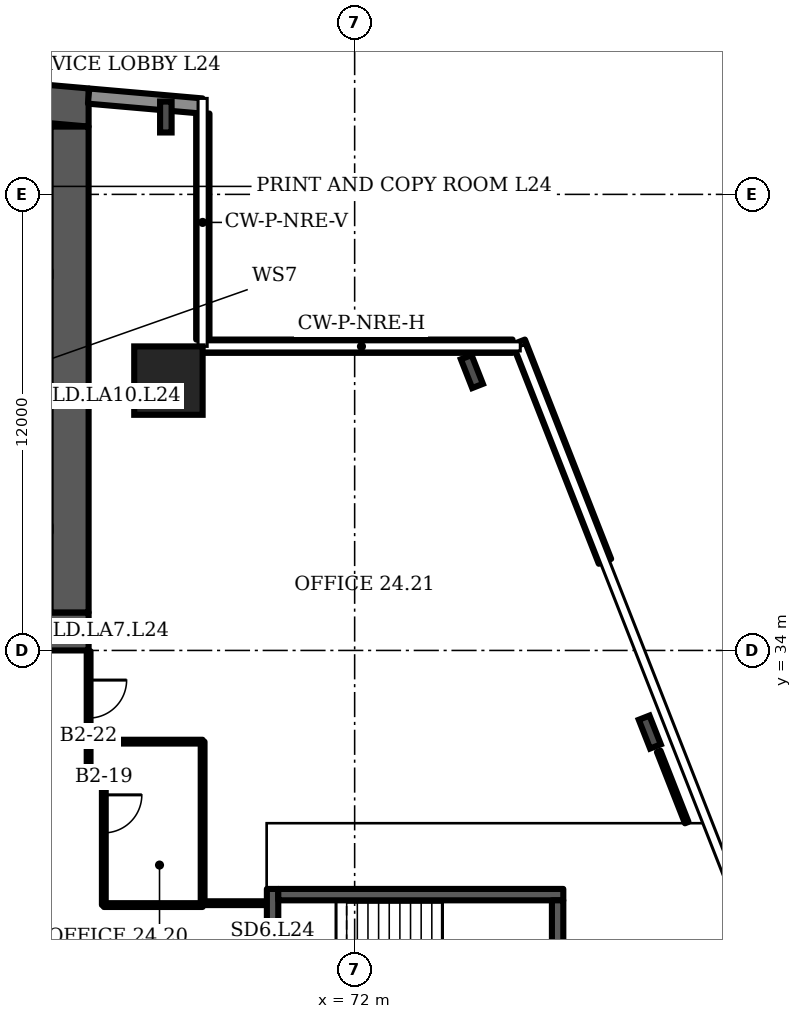
"""IFC4 building model, lengths in metres.
Left out: names, types, materials, properties, quantities, classifications, styles, units other than length and angle.
Written with IfcOpenShell. Run it as: python <this file> out.ifc"""

import sys

from ifc_helpers import new_model, si_unit, direction, frame, frame_2d, origin, origin_2d, place, context, subcontext, project, spatial, polyline, rectangle, i_section, outline, extrude, element, fill, save


model = new_model("IFC4")
c1 = context("Model", 3, precision=1e-05, world=origin(), true_north=direction((0.0, 1.0)))
c2 = subcontext(c1, "Body", "Model", "MODEL_VIEW")
j1 = project(units=[si_unit("LENGTHUNIT", "METRE"), si_unit("PLANEANGLEUNIT", "RADIAN")], contexts=[c1])
p1 = place(None, origin())
s1 = spatial("IfcSite", under=j1, at=p1, CompositionType="ELEMENT")
p2 = place(p1, origin())
s2 = spatial("IfcBuilding", under=s1, at=p2, CompositionType="ELEMENT")
p3 = place(p2, frame((0.0, 0.0, 107.5)))
s3 = spatial("IfcBuildingStorey", under=s2, at=p3, CompositionType="ELEMENT", Elevation=107.5)
p4 = place(p3, origin())
e1 = element("IfcWall", 1, at=p4, inside=s3, PredefinedType="SHEAR", context=c2, shape_type="SweptSolid", body=[
    extrude(outline(polyline([(16.0, 47.784), (40.5, 49.927), (65.0, 47.784), (65.0, 48.787), (40.5, 50.931), (16.0, 48.787), (16.0, 47.784)])), origin(), (0.0, 0.0, 1.0), 3.6),
])
p5 = place(p3, frame((16.0, 34.5, 0.0), z_axis=(0.0, 0.0, 1.0), x_axis=(1.0, 0.0, 0.0)))
e2 = element("IfcWall", 2, at=p5, inside=s3, PredefinedType="SHEAR", context=c2, shape_type="SweptSolid", body=[
    extrude(rectangle(XDim=49.0, YDim=1.0, at=frame_2d((24.5, 0.0))), origin(), (0.0, 0.0, 1.0), 3.6),
])
p6 = place(p5, frame((1.2, 0.0, 0.0)))
e3 = element("IfcOpeningElement", 3, at=p6, cuts=e2, PredefinedType="OPENING", context=c2, shape_type="SweptSolid", body=[
    extrude(rectangle(XDim=1.1, YDim=2.1, at=frame_2d((0.55, 1.05))), frame((0.0, 0.51, 0.0), z_axis=(0.0, -1.0, 0.0), x_axis=(1.0, 0.0, 0.0)), (0.0, 0.0, 1.0), 1.02),
])
p7 = place(p5, frame((5.083, 0.0, 0.0)))
e4 = element("IfcOpeningElement", 4, at=p7, cuts=e2, PredefinedType="OPENING", context=c2, shape_type="SweptSolid", body=[
    extrude(rectangle(XDim=1.1, YDim=2.1, at=frame_2d((0.55, 1.05))), frame((0.0, 0.51, 0.0), z_axis=(0.0, -1.0, 0.0), x_axis=(1.0, 0.0, 0.0)), (0.0, 0.0, 1.0), 1.02),
])
p8 = place(p5, frame((2.933, 0.0, 0.0)))
e5 = element("IfcOpeningElement", 5, at=p8, cuts=e2, PredefinedType="OPENING", context=c2, shape_type="SweptSolid", body=[
    extrude(rectangle(XDim=1.4, YDim=2.1, at=frame_2d((0.7, 1.05))), frame((0.0, 0.51, 0.0), z_axis=(0.0, -1.0, 0.0), x_axis=(1.0, 0.0, 0.0)), (0.0, 0.0, 1.0), 1.02),
])
p9 = place(p5, frame((7.65, 0.0, 0.0)))
e6 = element("IfcOpeningElement", 6, at=p9, cuts=e2, PredefinedType="OPENING", context=c2, shape_type="SweptSolid", body=[
    extrude(rectangle(XDim=1.2, YDim=2.1, at=frame_2d((0.6, 1.05))), frame((0.0, 0.51, 0.0), z_axis=(0.0, -1.0, 0.0), x_axis=(1.0, 0.0, 0.0)), (0.0, 0.0, 1.0), 1.02),
])
p10 = place(p5, frame((14.817, 0.0, 0.0)))
e7 = element("IfcOpeningElement", 7, at=p10, cuts=e2, PredefinedType="OPENING", context=c2, shape_type="SweptSolid", body=[
    extrude(rectangle(XDim=1.1, YDim=2.1, at=frame_2d((0.55, 1.05))), frame((0.0, 0.51, 0.0), z_axis=(0.0, -1.0, 0.0), x_axis=(1.0, 0.0, 0.0)), (0.0, 0.0, 1.0), 1.02),
])
p11 = place(p5, frame((19.083, 0.0, 0.0)))
e8 = element("IfcOpeningElement", 8, at=p11, cuts=e2, PredefinedType="OPENING", context=c2, shape_type="SweptSolid", body=[
    extrude(rectangle(XDim=1.1, YDim=2.1, at=frame_2d((0.55, 1.05))), frame((0.0, 0.51, 0.0), z_axis=(0.0, -1.0, 0.0), x_axis=(1.0, 0.0, 0.0)), (0.0, 0.0, 1.0), 1.02),
])
p12 = place(p5, frame((16.8, 0.0, 0.0)))
e9 = element("IfcOpeningElement", 9, at=p12, cuts=e2, PredefinedType="OPENING", context=c2, shape_type="SweptSolid", body=[
    extrude(rectangle(XDim=1.4, YDim=2.1, at=frame_2d((0.7, 1.05))), frame((0.0, 0.51, 0.0), z_axis=(0.0, -1.0, 0.0), x_axis=(1.0, 0.0, 0.0)), (0.0, 0.0, 1.0), 1.02),
])
p13 = place(p5, frame((21.817, 0.0, 0.0)))
e10 = element("IfcOpeningElement", 10, at=p13, cuts=e2, PredefinedType="OPENING", context=c2, shape_type="SweptSolid", body=[
    extrude(rectangle(XDim=1.1, YDim=2.1, at=frame_2d((0.55, 1.05))), frame((0.0, 0.51, 0.0), z_axis=(0.0, -1.0, 0.0), x_axis=(1.0, 0.0, 0.0)), (0.0, 0.0, 1.0), 1.02),
])
p14 = place(p5, frame((26.083, 0.0, 0.0)))
e11 = element("IfcOpeningElement", 11, at=p14, cuts=e2, PredefinedType="OPENING", context=c2, shape_type="SweptSolid", body=[
    extrude(rectangle(XDim=1.1, YDim=2.1, at=frame_2d((0.55, 1.05))), frame((0.0, 0.51, 0.0), z_axis=(0.0, -1.0, 0.0), x_axis=(1.0, 0.0, 0.0)), (0.0, 0.0, 1.0), 1.02),
])
p15 = place(p5, frame((33.15, 0.0, 0.0)))
e12 = element("IfcOpeningElement", 12, at=p15, cuts=e2, PredefinedType="OPENING", context=c2, shape_type="SweptSolid", body=[
    extrude(rectangle(XDim=1.2, YDim=2.1, at=frame_2d((0.6, 1.05))), frame((0.0, 0.51, 0.0), z_axis=(0.0, -1.0, 0.0), x_axis=(1.0, 0.0, 0.0)), (0.0, 0.0, 1.0), 1.02),
])
p16 = place(p5, frame((37.8, 0.0, 0.0)))
e13 = element("IfcOpeningElement", 13, at=p16, cuts=e2, PredefinedType="OPENING", context=c2, shape_type="SweptSolid", body=[
    extrude(rectangle(XDim=1.4, YDim=2.1, at=frame_2d((0.7, 1.05))), frame((0.0, 0.51, 0.0), z_axis=(0.0, -1.0, 0.0), x_axis=(1.0, 0.0, 0.0)), (0.0, 0.0, 1.0), 1.02),
])
p17 = place(p5, frame((42.817, 0.0, 0.0)))
e14 = element("IfcOpeningElement", 14, at=p17, cuts=e2, PredefinedType="OPENING", context=c2, shape_type="SweptSolid", body=[
    extrude(rectangle(XDim=1.1, YDim=2.1, at=frame_2d((0.55, 1.05))), frame((0.0, 0.51, 0.0), z_axis=(0.0, -1.0, 0.0), x_axis=(1.0, 0.0, 0.0)), (0.0, 0.0, 1.0), 1.02),
])
p18 = place(p5, frame((46.7, 0.0, 0.0)))
e15 = element("IfcOpeningElement", 15, at=p18, cuts=e2, PredefinedType="OPENING", context=c2, shape_type="SweptSolid", body=[
    extrude(rectangle(XDim=1.1, YDim=2.1, at=frame_2d((0.55, 1.05))), frame((0.0, 0.51, 0.0), z_axis=(0.0, -1.0, 0.0), x_axis=(1.0, 0.0, 0.0)), (0.0, 0.0, 1.0), 1.02),
])
p19 = place(p5, frame((44.667, 0.0, 0.0)))
e16 = element("IfcOpeningElement", 16, at=p19, cuts=e2, PredefinedType="OPENING", context=c2, shape_type="SweptSolid", body=[
    extrude(rectangle(XDim=1.4, YDim=2.1, at=frame_2d((0.7, 1.05))), frame((0.0, 0.51, 0.0), z_axis=(0.0, -1.0, 0.0), x_axis=(1.0, 0.0, 0.0)), (0.0, 0.0, 1.0), 1.02),
])
p20 = place(p3, frame((64.5, 35.0, 0.0), z_axis=(0.0, 0.0, 1.0), x_axis=(0.0, 1.0, 0.0)))
e17 = element("IfcWall", 17, at=p20, inside=s3, PredefinedType="SHEAR", context=c2, shape_type="SweptSolid", body=[
    extrude(rectangle(XDim=12.784, YDim=1.0, at=frame_2d((6.392, 0.0))), origin(), (0.0, 0.0, 1.0), 3.6),
])
p21 = place(p3, frame((67.1, 41.1, 0.0), z_axis=(0.0, 0.0, 1.0), x_axis=(1.0, 0.0, 0.0)))
e18 = element("IfcColumn", 18, at=p21, inside=s3, PredefinedType="COLUMN", context=c2, shape_type="SweptSolid", body=[
    extrude(rectangle(XDim=1.8, YDim=1.8, at=origin_2d()), origin(), (0.0, 0.0, 1.0), 3.6),
])
for number, where, z_axis, x_axis in (
    (19, (79.766, 31.853, 0.0), (0.0, 0.0, 1.0), (0.931, 0.366, 0.0)),
    (20, (75.085, 41.338, 0.0), (0.0, 0.0, 1.0), (0.931, 0.366, 0.0)),
    (21, (67.032, 48.036, 0.0), (0.0, 0.0, 1.0), (1.0, 0.0, 0.0)),
):
    element("IfcColumn", number, at=place(p3, frame(where, z_axis=z_axis, x_axis=x_axis)), inside=s3, PredefinedType="COLUMN", context=c2, shape_type="SweptSolid", body=[
        extrude(i_section(OverallWidth=0.303, OverallDepth=0.814, WebThickness=0.021, FlangeThickness=0.04, FilletRadius=0.03, at=origin_2d()), origin(), (0.0, 0.0, 1.0), 3.6),
    ])
p22 = place(p3, frame((67.983, 48.326, 0.0), z_axis=(0.0, 0.0, 1.0), x_axis=(-0.996194, 0.087168, 0.0)))
e22 = element("IfcWall", 22, at=p22, inside=s3, PredefinedType="SOLIDWALL", context=c2, shape_type="SweptSolid", body=[
    extrude(rectangle(XDim=2.994, YDim=0.4, at=frame_2d((1.497, 0.0))), origin(), (0.0, 0.0, 1.0), 3.2),
])
p23 = place(p3, frame((78.586, 36.344, 0.0), z_axis=(0.0, 0.0, 1.0), x_axis=(-0.365792, 0.930699, 0.0)))
e23 = element("IfcWall", 23, at=p23, inside=s3, PredefinedType="SOLIDWALL", context=c2, shape_type="SweptSolid", body=[
    extrude(rectangle(XDim=6.202, YDim=0.35, at=frame_2d((3.101, 0.0))), origin(), (0.0, 0.0, 1.0), 1.0),
])
p24 = place(p3, frame((76.155, 42.005, 0.0), z_axis=(0.0, 0.0, 1.0), x_axis=(-1.0, 0.0, 0.0)))
e24 = element("IfcWall", 24, at=p24, inside=s3, PredefinedType="SOLIDWALL", context=c2, shape_type="SweptSolid", body=[
    extrude(rectangle(XDim=8.155, YDim=0.35, at=frame_2d((4.078, 0.0))), origin(), (0.0, 0.0, 1.0), 1.0),
])
p25 = place(p3, frame((68.005, 42.18, 0.0), z_axis=(0.0, 0.0, 1.0), x_axis=(0.0, 1.0, 0.0)))
e25 = element("IfcWall", 25, at=p25, inside=s3, PredefinedType="SOLIDWALL", context=c2, shape_type="SweptSolid", body=[
    extrude(rectangle(XDim=5.947, YDim=0.35, at=frame_2d((2.973, 0.0))), origin(), (0.0, 0.0, 1.0), 1.0),
])
p26 = place(p3, frame((69.84, 23.375, 0.0), z_axis=(0.0, 0.0, 1.0), x_axis=(0.0, 1.0, 0.0)))
e26 = element("IfcWall", 26, at=p26, inside=s3, PredefinedType="SHEAR", context=c2, shape_type="SweptSolid", body=[
    extrude(rectangle(XDim=4.35, YDim=0.3, at=frame_2d((2.175, 0.0))), origin(), (0.0, 0.0, 1.0), 3.2),
])
p27 = place(p26, frame((1.575, 0.0, 0.0)))
e27 = element("IfcOpeningElement", 27, at=p27, cuts=e26, PredefinedType="OPENING", context=c2, shape_type="SweptSolid", body=[
    extrude(rectangle(XDim=1.2, YDim=2.1, at=frame_2d((0.6, 1.05))), frame((0.0, 0.16, 0.0), z_axis=(0.0, -1.0, 0.0), x_axis=(1.0, 0.0, 0.0)), (0.0, 0.0, 1.0), 0.32),
])
p28 = place(p3, frame((65.0, 30.56, 0.0), z_axis=(0.0, 0.0, 1.0), x_axis=(0.0, 1.0, 0.0)))
e28 = element("IfcWall", 28, at=p28, inside=s3, PredefinedType="PARTITIONING", context=c2, shape_type="SweptSolid", body=[
    extrude(rectangle(XDim=3.42, YDim=0.1, at=frame_2d((1.71, 0.0))), origin(), (0.0, 0.0, 1.0), 3.2),
])
p29 = place(p28, frame((1.66, 0.0, 0.0)))
e29 = element("IfcOpeningElement", 29, at=p29, cuts=e28, PredefinedType="OPENING", context=c2, shape_type="SweptSolid", body=[
    extrude(rectangle(XDim=1.0, YDim=2.1, at=frame_2d((0.5, 1.05))), frame((0.0, 0.06, 0.0), z_axis=(0.0, -1.0, 0.0), x_axis=(1.0, 0.0, 0.0)), (0.0, 0.0, 1.0), 0.12),
])
p30 = place(p3, frame((65.0, 31.6, 0.0), z_axis=(0.0, 0.0, 1.0), x_axis=(1.0, 0.0, 0.0)))
e30 = element("IfcWall", 30, at=p30, inside=s3, PredefinedType="PARTITIONING", context=c2, shape_type="SweptSolid", body=[
    extrude(rectangle(XDim=3.0, YDim=0.1, at=frame_2d((1.5, 0.0))), origin(), (0.0, 0.0, 1.0), 3.2),
])
p31 = place(p3, frame((65.395, 30.5, 0.0), z_axis=(0.0, 0.0, 1.0), x_axis=(-0.988637, 0.150312, 0.0)))
e31 = element("IfcWall", 31, at=p31, inside=s3, PredefinedType="PARTITIONING", context=c2, shape_type="SweptSolid", body=[
    extrude(rectangle(XDim=0.4, YDim=0.1, at=frame_2d((0.2, 0.0))), origin(), (0.0, 0.0, 1.0), 3.2),
])
p32 = place(p3, frame((65.4, 27.3, 0.0), z_axis=(0.0, 0.0, 1.0), x_axis=(0.0, 1.0, 0.0)))
e32 = element("IfcWall", 32, at=p32, inside=s3, PredefinedType="PARTITIONING", context=c2, shape_type="SweptSolid", body=[
    extrude(rectangle(XDim=3.2, YDim=0.1, at=frame_2d((1.6, 0.0))), origin(), (0.0, 0.0, 1.0), 3.2),
])
p33 = place(p32, frame((1.9, 0.0, 0.0)))
e33 = element("IfcOpeningElement", 33, at=p33, cuts=e32, PredefinedType="OPENING", context=c2, shape_type="SweptSolid", body=[
    extrude(rectangle(XDim=1.0, YDim=2.1, at=frame_2d((0.5, 1.05))), frame((0.0, 0.06, 0.0), z_axis=(0.0, -1.0, 0.0), x_axis=(1.0, 0.0, 0.0)), (0.0, 0.0, 1.0), 0.12),
])
p34 = place(p3, frame((65.4, 27.3, 0.0), z_axis=(0.0, 0.0, 1.0), x_axis=(1.0, 0.0, 0.0)))
e34 = element("IfcWall", 34, at=p34, inside=s3, PredefinedType="PARTITIONING", context=c2, shape_type="SweptSolid", body=[
    extrude(rectangle(XDim=2.6, YDim=0.1, at=frame_2d((1.3, 0.0))), origin(), (0.0, 0.0, 1.0), 3.2),
])
p35 = place(p3, frame((68.0, 27.3, 0.0), z_axis=(0.0, 0.0, 1.0), x_axis=(0.0, 1.0, 0.0)))
e35 = element("IfcWall", 35, at=p35, inside=s3, PredefinedType="PARTITIONING", context=c2, shape_type="SweptSolid", body=[
    extrude(rectangle(XDim=4.3, YDim=0.1, at=frame_2d((2.15, 0.0))), origin(), (0.0, 0.0, 1.0), 3.2),
])
p36 = place(p3, frame((68.05, 27.35, 0.0), z_axis=(0.0, 0.0, 1.0), x_axis=(1.0, 0.0, 0.0)))
e36 = element("IfcWall", 36, at=p36, inside=s3, PredefinedType="PARTITIONING", context=c2, shape_type="SweptSolid", body=[
    extrude(rectangle(XDim=1.62, YDim=0.1, at=frame_2d((0.81, 0.0))), origin(), (0.0, 0.0, 1.0), 3.2),
])
p37 = place(p3, frame((80.737, 29.47, 0.0), z_axis=(0.0, 0.0, 1.0), x_axis=(-0.365847, 0.930674, 0.0)))
e37 = element("IfcWall", 37, at=p37, inside=s3, PredefinedType="PARTITIONING", context=c2, shape_type="SweptSolid", body=[
    extrude(rectangle(XDim=2.015, YDim=0.1, at=frame_2d((1.007, 0.0))), origin(), (0.0, 0.0, 1.0), 2.58),
])
p38 = place(p3, frame((69.99, 27.575, 0.0), z_axis=(0.0, 0.0, 1.0), x_axis=(1.0, 0.0, 0.0)))
e38 = element("IfcWall", 38, at=p38, inside=s3, PredefinedType="SHEAR", context=c2, shape_type="SweptSolid", body=[
    extrude(rectangle(XDim=7.5, YDim=0.3, at=frame_2d((3.75, 0.0))), origin(), (0.0, 0.0, 1.0), 3.2),
])
p39 = place(p3, frame((77.34, 23.675, 0.0), z_axis=(0.0, 0.0, 1.0), x_axis=(0.0, 1.0, 0.0)))
e39 = element("IfcWall", 39, at=p39, inside=s3, PredefinedType="SHEAR", context=c2, shape_type="SweptSolid", body=[
    extrude(rectangle(XDim=3.75, YDim=0.3, at=frame_2d((1.875, 0.0))), origin(), (0.0, 0.0, 1.0), 3.2),
])
p40 = place(p33, origin())
e40 = element("IfcDoor", 40, at=p40, inside=s3, OperationType="SINGLE_SWING_RIGHT", PredefinedType="DOOR", context=c2, shape_type="SweptSolid", body=[
    extrude(rectangle(XDim=1.0, YDim=2.1, at=frame_2d((0.5, 1.05))), frame((0.0, 0.025, 0.0), z_axis=(0.0, -1.0, 0.0), x_axis=(1.0, 0.0, 0.0)), (0.0, 0.0, 1.0), 0.05),
])
fill(e33, e40)
p41 = place(p29, origin())
e41 = element("IfcDoor", 41, at=p41, inside=s3, OperationType="SINGLE_SWING_RIGHT", PredefinedType="DOOR", context=c2, shape_type="SweptSolid", body=[
    extrude(rectangle(XDim=1.0, YDim=2.1, at=frame_2d((0.5, 1.05))), frame((0.0, 0.025, 0.0), z_axis=(0.0, -1.0, 0.0), x_axis=(1.0, 0.0, 0.0)), (0.0, 0.0, 1.0), 0.05),
])
fill(e29, e41)
save(model, sys.argv[1])
